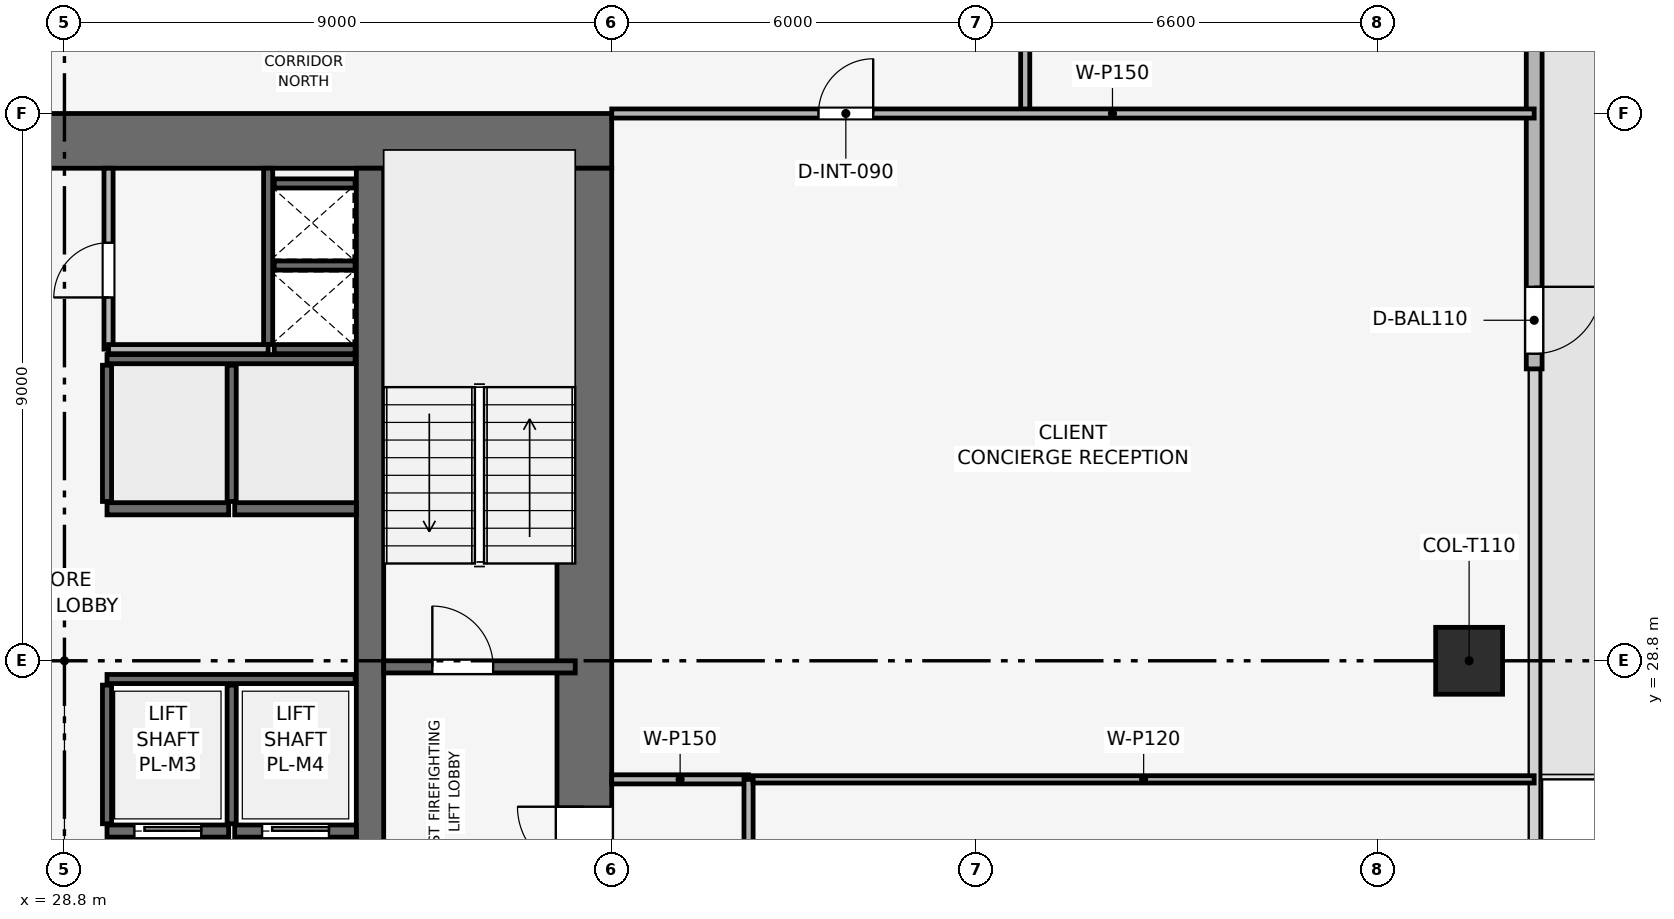
"""IFC4 building model, lengths in metres.
Left out: names, types, materials, properties, quantities, classifications, styles, units other than length and angle.
Written with IfcOpenShell. Run it as: python <this file> out.ifc"""

import sys

from ifc_helpers import new_model, si_unit, direction, frame, frame_2d, origin, origin_2d, place, context, subcontext, project, spatial, rectangle, extrude, element, fill, save


model = new_model("IFC4")
c1 = context("Model", 3, precision=1e-05, world=origin(), true_north=direction((0.0, 1.0)))
c2 = subcontext(c1, "Body", "Model", "MODEL_VIEW")
j1 = project(units=[si_unit("LENGTHUNIT", "METRE"), si_unit("PLANEANGLEUNIT", "RADIAN")], contexts=[c1])
p1 = place(None, origin())
s1 = spatial("IfcSite", under=j1, at=p1, CompositionType="ELEMENT")
p2 = place(p1, origin())
s2 = spatial("IfcBuilding", under=s1, at=p2, CompositionType="ELEMENT")
p3 = place(p2, frame((0.0, 0.0, 157.05)))
s3 = spatial("IfcBuildingStorey", under=s2, at=p3, CompositionType="ELEMENT", Elevation=157.05)
p4 = place(p3, frame((19.8, 37.35, 0.0), z_axis=(0.0, 0.0, 1.0), x_axis=(1.0, 0.0, 0.0)))
e1 = element("IfcWall", 1, at=p4, inside=s3, PredefinedType="SHEAR", context=c2, shape_type="SweptSolid", body=[
    extrude(rectangle(XDim=18.0, YDim=0.9, at=frame_2d((9.0, 0.0))), origin(), (0.0, 0.0, 1.0), 3.75),
])
p5 = place(p4, frame((7.05, 0.0, 0.0)))
e2 = element("IfcOpeningElement", 2, at=p5, cuts=e1, PredefinedType="OPENING", context=c2, shape_type="SweptSolid", body=[
    extrude(rectangle(XDim=1.1, YDim=2.15, at=frame_2d((0.55, 1.075))), frame((0.0, 0.46, 0.0), z_axis=(0.0, -1.0, 0.0), x_axis=(1.0, 0.0, 0.0)), (0.0, 0.0, 1.0), 0.92),
])
p6 = place(p3, frame((37.35, 20.7, 0.0), z_axis=(0.0, 0.0, 1.0), x_axis=(0.0, 1.0, 0.0)))
e3 = element("IfcWall", 3, at=p6, inside=s3, PredefinedType="SHEAR", context=c2, shape_type="SweptSolid", body=[
    extrude(rectangle(XDim=16.2, YDim=0.9, at=frame_2d((8.1, 0.0))), origin(), (0.0, 0.0, 1.0), 3.75),
])
p7 = place(p6, frame((4.6, 0.0, 0.0)))
e4 = element("IfcOpeningElement", 4, at=p7, cuts=e3, PredefinedType="OPENING", context=c2, shape_type="SweptSolid", body=[
    extrude(rectangle(XDim=1.1, YDim=2.15, at=frame_2d((0.55, 1.075))), frame((0.0, 0.46, 0.0), z_axis=(0.0, -1.0, 0.0), x_axis=(1.0, 0.0, 0.0)), (0.0, 0.0, 1.0), 0.92),
])
p8 = place(p3, frame((33.825, 20.7, 0.0), z_axis=(0.0, 0.0, 1.0), x_axis=(0.0, 1.0, 0.0)))
e5 = element("IfcWall", 5, at=p8, inside=s3, PredefinedType="SHEAR", context=c2, shape_type="SweptSolid", body=[
    extrude(rectangle(XDim=16.2, YDim=0.45, at=frame_2d((8.1, 0.0))), origin(), (0.0, 0.0, 1.0), 3.75),
])
p9 = place(p3, frame((51.9, 28.8, 0.003), z_axis=(0.0, 0.0, 1.0), x_axis=(1.0, 0.0, 0.0)))
e6 = element("IfcColumn", 6, at=p9, inside=s3, PredefinedType="COLUMN", context=c2, shape_type="SweptSolid", body=[
    extrude(rectangle(XDim=1.1, YDim=1.1, at=origin_2d()), origin(), (0.0, 0.0, 1.0), 3.489),
])
p10 = place(p3, frame((52.97, 46.2, 0.0), z_axis=(0.0, 0.0, 1.0), x_axis=(0.0, -1.0, 0.0)))
e7 = element("IfcWall", 7, at=p10, inside=s3, PredefinedType="SOLIDWALL", context=c2, shape_type="SweptSolid", body=[
    extrude(rectangle(XDim=12.6, YDim=0.26, at=frame_2d((6.3, 0.0))), origin(), (0.0, 0.0, 1.0), 3.495),
])
p11 = place(p10, frame((11.25, 0.0, 0.0)))
e8 = element("IfcOpeningElement", 8, at=p11, cuts=e7, PredefinedType="OPENING", context=c2, shape_type="SweptSolid", body=[
    extrude(rectangle(XDim=1.1, YDim=2.2, at=frame_2d((0.55, 1.1))), frame((0.0, 0.14, 0.0), z_axis=(0.0, -1.0, 0.0), x_axis=(1.0, 0.0, 0.0)), (0.0, 0.0, 1.0), 0.28),
])
p12 = place(p3, frame((34.05, 28.7, 0.0), z_axis=(0.0, 0.0, 1.0), x_axis=(1.0, 0.0, 0.0)))
e9 = element("IfcWall", 9, at=p12, inside=s3, PredefinedType="SHEAR", context=c2, shape_type="SweptSolid", body=[
    extrude(rectangle(XDim=3.15, YDim=0.2, at=frame_2d((1.575, 0.0))), origin(), (0.0, 0.0, 1.0), 3.495),
])
p13 = place(p12, frame((0.8, 0.0, 0.0)))
e10 = element("IfcOpeningElement", 10, at=p13, cuts=e9, PredefinedType="OPENING", context=c2, shape_type="SweptSolid", body=[
    extrude(rectangle(XDim=1.0, YDim=2.1, at=frame_2d((0.5, 1.05))), frame((0.0, 0.11, 0.0), z_axis=(0.0, -1.0, 0.0), x_axis=(1.0, 0.0, 0.0)), (0.0, 0.0, 1.0), 0.22),
])
p14 = place(p3, frame((32.15, 34.0, 0.0), z_axis=(0.0, 0.0, 1.0), x_axis=(0.0, 1.0, 0.0)))
e11 = element("IfcWall", 11, at=p14, inside=s3, PredefinedType="SHEAR", context=c2, shape_type="SweptSolid", body=[
    extrude(rectangle(XDim=2.9, YDim=0.15, at=frame_2d((1.45, 0.0))), origin(), (0.0, 0.0, 1.0), 3.495),
])
for number, where, z_axis, x_axis in (
    (12, (32.25, 33.925, 0.0), (0.0, 0.0, 1.0), (1.0, 0.0, 0.0)),
    (13, (32.25, 35.3, 0.0), (0.0, 0.0, 1.0), (1.0, 0.0, 0.0)),
):
    element("IfcWall", number, at=place(p3, frame(where, z_axis=z_axis, x_axis=x_axis)), inside=s3, PredefinedType="SHEAR", context=c2, shape_type="SweptSolid", body=[
        extrude(rectangle(XDim=1.33, YDim=0.15, at=frame_2d((0.665, 0.0))), origin(), (0.0, 0.0, 1.0), 3.495),
    ])
p15 = place(p3, frame((29.5, 26.0, 0.0), z_axis=(0.0, 0.0, 1.0), x_axis=(1.0, 0.0, 0.0)))
e14 = element("IfcWall", 14, at=p15, inside=s3, PredefinedType="SHEAR", context=c2, shape_type="SweptSolid", body=[
    extrude(rectangle(XDim=2.0, YDim=0.2, at=frame_2d((1.0, 0.0))), origin(), (0.0, 0.0, 1.0), 3.495),
])
p16 = place(p15, frame((0.45, 0.0, 0.0)))
e15 = element("IfcOpeningElement", 15, at=p16, cuts=e14, PredefinedType="OPENING", context=c2, shape_type="SweptSolid", body=[
    extrude(rectangle(XDim=1.1, YDim=2.15, at=frame_2d((0.55, 1.075))), frame((0.0, 0.11, 0.0), z_axis=(0.0, -1.0, 0.0), x_axis=(1.0, 0.0, 0.0)), (0.0, 0.0, 1.0), 0.22),
])
p17 = place(p3, frame((31.6, 26.0, 0.0), z_axis=(0.0, 0.0, 1.0), x_axis=(1.0, 0.0, 0.0)))
e16 = element("IfcWall", 16, at=p17, inside=s3, PredefinedType="SHEAR", context=c2, shape_type="SweptSolid", body=[
    extrude(rectangle(XDim=2.0, YDim=0.2, at=frame_2d((1.0, 0.0))), origin(), (0.0, 0.0, 1.0), 3.495),
])
p18 = place(p17, frame((0.45, 0.0, 0.0)))
e17 = element("IfcOpeningElement", 17, at=p18, cuts=e16, PredefinedType="OPENING", context=c2, shape_type="SweptSolid", body=[
    extrude(rectangle(XDim=1.1, YDim=2.15, at=frame_2d((0.55, 1.075))), frame((0.0, 0.11, 0.0), z_axis=(0.0, -1.0, 0.0), x_axis=(1.0, 0.0, 0.0)), (0.0, 0.0, 1.0), 0.22),
])
for number, where, z_axis, x_axis in (
    (18, (29.5, 31.3, 0.0), (0.0, 0.0, 1.0), (1.0, 0.0, 0.0)),
    (19, (31.6, 31.3, 0.0), (0.0, 0.0, 1.0), (1.0, 0.0, 0.0)),
):
    element("IfcWall", number, at=place(p3, frame(where, z_axis=z_axis, x_axis=x_axis)), inside=s3, PredefinedType="SHEAR", context=c2, shape_type="SweptSolid", body=[
        extrude(rectangle(XDim=2.0, YDim=0.2, at=frame_2d((1.0, 0.0))), origin(), (0.0, 0.0, 1.0), 3.495),
    ])
p19 = place(p3, frame((32.25, 36.65, 0.0), z_axis=(0.0, 0.0, 1.0), x_axis=(1.0, 0.0, 0.0)))
e20 = element("IfcWall", 20, at=p19, inside=s3, PredefinedType="SHEAR", context=c2, shape_type="SweptSolid", body=[
    extrude(rectangle(XDim=1.33, YDim=0.15, at=frame_2d((0.665, 0.0))), origin(), (0.0, 0.0, 1.0), 3.495),
])
p20 = place(p3, frame((29.5, 28.5, 0.0), z_axis=(0.0, 0.0, 1.0), x_axis=(1.0, 0.0, 0.0)))
e21 = element("IfcWall", 21, at=p20, inside=s3, PredefinedType="SHEAR", context=c2, shape_type="SweptSolid", body=[
    extrude(rectangle(XDim=4.08, YDim=0.15, at=frame_2d((2.04, 0.0))), origin(), (0.0, 0.0, 1.0), 3.495),
])
for number, where, z_axis, x_axis in (
    (22, (29.5, 26.12, 0.0), (0.0, 0.0, 1.0), (0.0, 1.0, 0.0)),
    (23, (31.55, 26.12, 0.0), (0.0, 0.0, 1.0), (0.0, 1.0, 0.0)),
):
    element("IfcWall", number, at=place(p3, frame(where, z_axis=z_axis, x_axis=x_axis)), inside=s3, PredefinedType="SHEAR", context=c2, shape_type="SweptSolid", body=[
        extrude(rectangle(XDim=2.28, YDim=0.15, at=frame_2d((1.14, 0.0))), origin(), (0.0, 0.0, 1.0), 3.495),
    ])
p21 = place(p3, frame((29.5, 33.76, 0.0), z_axis=(0.0, 0.0, 1.0), x_axis=(1.0, 0.0, 0.0)))
e24 = element("IfcWall", 24, at=p21, inside=s3, PredefinedType="SHEAR", context=c2, shape_type="SweptSolid", body=[
    extrude(rectangle(XDim=4.08, YDim=0.15, at=frame_2d((2.04, 0.0))), origin(), (0.0, 0.0, 1.0), 3.495),
])
for number, where, z_axis, x_axis in (
    (25, (29.5, 31.42, 0.0), (0.0, 0.0, 1.0), (0.0, 1.0, 0.0)),
    (26, (31.55, 31.42, 0.0), (0.0, 0.0, 1.0), (0.0, 1.0, 0.0)),
):
    element("IfcWall", number, at=place(p3, frame(where, z_axis=z_axis, x_axis=x_axis)), inside=s3, PredefinedType="SHEAR", context=c2, shape_type="SweptSolid", body=[
        extrude(rectangle(XDim=2.24, YDim=0.15, at=frame_2d((1.12, 0.0))), origin(), (0.0, 0.0, 1.0), 3.495),
    ])
p22 = place(p3, frame((29.525, 33.925, 0.0), z_axis=(0.0, 0.0, 1.0), x_axis=(0.0, 1.0, 0.0)))
e27 = element("IfcWall", 27, at=p22, inside=s3, PredefinedType="PARTITIONING", context=c2, shape_type="SweptSolid", body=[
    extrude(rectangle(XDim=2.975, YDim=0.15, at=frame_2d((1.487, 0.0))), origin(), (0.0, 0.0, 1.0), 3.495),
])
p23 = place(p22, frame((0.85, 0.0, 0.0)))
e28 = element("IfcOpeningElement", 28, at=p23, cuts=e27, PredefinedType="OPENING", context=c2, shape_type="SweptSolid", body=[
    extrude(rectangle(XDim=0.9, YDim=2.1, at=frame_2d((0.45, 1.05))), frame((0.0, 0.085, 0.0), z_axis=(0.0, -1.0, 0.0), x_axis=(1.0, 0.0, 0.0)), (0.0, 0.0, 1.0), 0.17),
])
p24 = place(p3, frame((29.525, 33.925, 0.0), z_axis=(0.0, 0.0, 1.0), x_axis=(1.0, 0.0, 0.0)))
e29 = element("IfcWall", 29, at=p24, inside=s3, PredefinedType="PARTITIONING", context=c2, shape_type="SweptSolid", body=[
    extrude(rectangle(XDim=2.625, YDim=0.15, at=frame_2d((1.312, 0.0))), origin(), (0.0, 0.0, 1.0), 3.495),
])
p25 = place(p3, frame((37.8, 26.85, 0.0), z_axis=(0.0, 0.0, 1.0), x_axis=(1.0, 0.0, 0.0)))
e30 = element("IfcWall", 30, at=p25, inside=s3, PredefinedType="PARTITIONING", context=c2, shape_type="SweptSolid", body=[
    extrude(rectangle(XDim=2.25, YDim=0.15, at=frame_2d((1.125, 0.0))), origin(), (0.0, 0.0, 1.0), 3.495),
])
p26 = place(p3, frame((40.05, 19.8, 0.0), z_axis=(0.0, 0.0, 1.0), x_axis=(0.0, 1.0, 0.0)))
e31 = element("IfcWall", 31, at=p26, inside=s3, PredefinedType="PARTITIONING", context=c2, shape_type="SweptSolid", body=[
    extrude(rectangle(XDim=7.05, YDim=0.15, at=frame_2d((3.525, 0.0))), origin(), (0.0, 0.0, 1.0), 3.03),
])
p27 = place(p3, frame((40.125, 26.85, 0.0), z_axis=(0.0, 0.0, 1.0), x_axis=(1.0, 0.0, 0.0)))
e32 = element("IfcWall", 32, at=p27, inside=s3, PredefinedType="PARTITIONING", context=c2, shape_type="SweptSolid", body=[
    extrude(rectangle(XDim=12.845, YDim=0.12, at=frame_2d((6.422, 0.0))), origin(), (0.0, 0.0, 1.0), 2.98),
])
p28 = place(p3, frame((44.6, 37.8, 0.0), z_axis=(0.0, 0.0, 1.0), x_axis=(0.0, 1.0, 0.0)))
e33 = element("IfcWall", 33, at=p28, inside=s3, PredefinedType="PARTITIONING", context=c2, shape_type="SweptSolid", body=[
    extrude(rectangle(XDim=2.4, YDim=0.15, at=frame_2d((1.2, 0.0))), origin(), (0.0, 0.0, 1.0), 3.495),
])
p29 = place(p3, frame((37.8, 37.8, 0.0), z_axis=(0.0, 0.0, 1.0), x_axis=(1.0, 0.0, 0.0)))
e34 = element("IfcWall", 34, at=p29, inside=s3, PredefinedType="PARTITIONING", context=c2, shape_type="SweptSolid", body=[
    extrude(rectangle(XDim=15.17, YDim=0.15, at=frame_2d((7.585, 0.0))), origin(), (0.0, 0.0, 1.0), 2.98),
])
p30 = place(p29, frame((3.4, 0.0, 0.0)))
e35 = element("IfcOpeningElement", 35, at=p30, cuts=e34, PredefinedType="OPENING", context=c2, shape_type="SweptSolid", body=[
    extrude(rectangle(XDim=0.9, YDim=2.1, at=frame_2d((0.45, 1.05))), frame((0.0, 0.085, 0.0), z_axis=(0.0, -1.0, 0.0), x_axis=(1.0, 0.0, 0.0)), (0.0, 0.0, 1.0), 0.17),
])
p31 = place(p11, origin())
e36 = element("IfcDoor", 36, at=p31, inside=s3, OperationType="SINGLE_SWING_LEFT", PredefinedType="DOOR", context=c2, shape_type="SweptSolid", body=[
    extrude(rectangle(XDim=1.1, YDim=2.2, at=frame_2d((0.55, 1.1))), frame((0.0, 0.025, 0.0), z_axis=(0.0, -1.0, 0.0), x_axis=(1.0, 0.0, 0.0)), (0.0, 0.0, 1.0), 0.05),
])
fill(e8, e36)
p32 = place(p13, origin())
e37 = element("IfcDoor", 37, at=p32, inside=s3, OperationType="SINGLE_SWING_LEFT", PredefinedType="DOOR", context=c2, shape_type="SweptSolid", body=[
    extrude(rectangle(XDim=1.0, YDim=2.1, at=frame_2d((0.5, 1.05))), frame((0.0, 0.025, 0.0), z_axis=(0.0, -1.0, 0.0), x_axis=(1.0, 0.0, 0.0)), (0.0, 0.0, 1.0), 0.05),
])
fill(e10, e37)
p33 = place(p16, origin())
e38 = element("IfcDoor", 38, at=p33, inside=s3, OperationType="SLIDING_TO_RIGHT", PredefinedType="DOOR", context=c2, shape_type="SweptSolid", body=[
    extrude(rectangle(XDim=1.1, YDim=2.15, at=frame_2d((0.55, 1.075))), frame((0.0, 0.025, 0.0), z_axis=(0.0, -1.0, 0.0), x_axis=(1.0, 0.0, 0.0)), (0.0, 0.0, 1.0), 0.05),
])
fill(e15, e38)
p34 = place(p18, origin())
e39 = element("IfcDoor", 39, at=p34, inside=s3, OperationType="SLIDING_TO_RIGHT", PredefinedType="DOOR", context=c2, shape_type="SweptSolid", body=[
    extrude(rectangle(XDim=1.1, YDim=2.15, at=frame_2d((0.55, 1.075))), frame((0.0, 0.025, 0.0), z_axis=(0.0, -1.0, 0.0), x_axis=(1.0, 0.0, 0.0)), (0.0, 0.0, 1.0), 0.05),
])
fill(e17, e39)
p35 = place(p23, origin())
e40 = element("IfcDoor", 40, at=p35, inside=s3, OperationType="SINGLE_SWING_LEFT", PredefinedType="DOOR", context=c2, shape_type="SweptSolid", body=[
    extrude(rectangle(XDim=0.9, YDim=2.1, at=frame_2d((0.45, 1.05))), frame((0.0, 0.025, 0.0), z_axis=(0.0, -1.0, 0.0), x_axis=(1.0, 0.0, 0.0)), (0.0, 0.0, 1.0), 0.05),
])
fill(e28, e40)
p36 = place(p30, origin())
e41 = element("IfcDoor", 41, at=p36, inside=s3, OperationType="SINGLE_SWING_RIGHT", PredefinedType="DOOR", context=c2, shape_type="SweptSolid", body=[
    extrude(rectangle(XDim=0.9, YDim=2.1, at=frame_2d((0.45, 1.05))), frame((0.0, 0.025, 0.0), z_axis=(0.0, -1.0, 0.0), x_axis=(1.0, 0.0, 0.0)), (0.0, 0.0, 1.0), 0.05),
])
fill(e35, e41)
p37 = place(p7, origin())
e42 = element("IfcDoor", 42, at=p37, inside=s3, OperationType="SINGLE_SWING_RIGHT", PredefinedType="DOOR", context=c2, shape_type="SweptSolid", body=[
    extrude(rectangle(XDim=1.1, YDim=2.15, at=frame_2d((0.55, 1.075))), frame((0.0, 0.025, 0.0), z_axis=(0.0, -1.0, 0.0), x_axis=(1.0, 0.0, 0.0)), (0.0, 0.0, 1.0), 0.05),
])
fill(e4, e42)
save(model, sys.argv[1])
